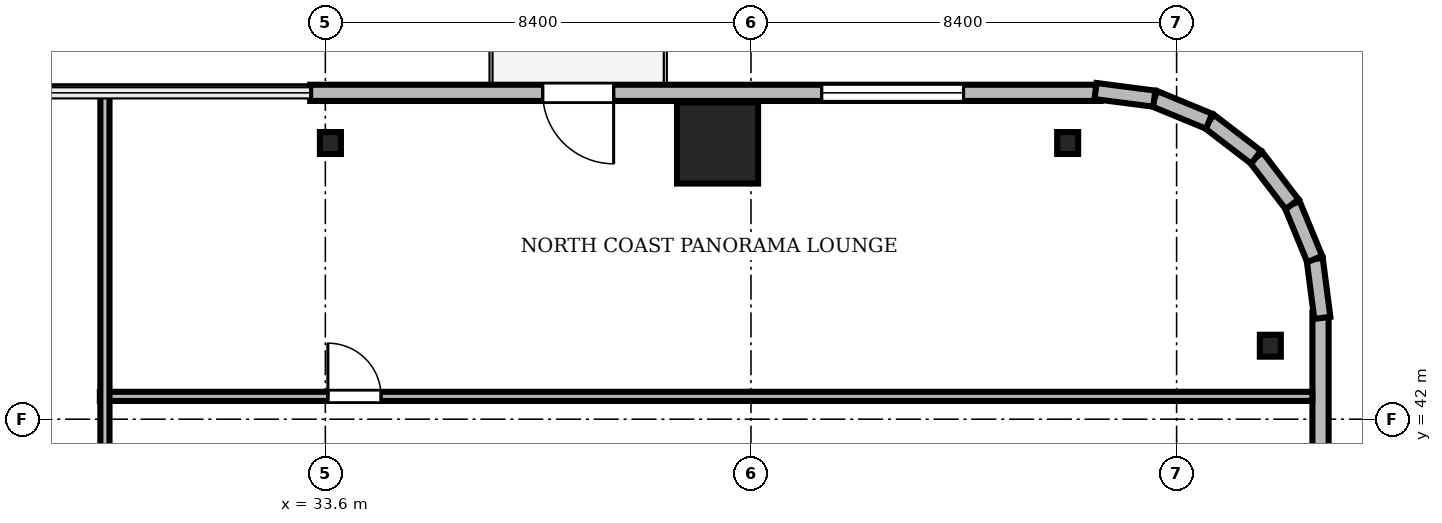
"""IFC4 building model, lengths in metres.
Left out: names, types, materials, properties, quantities, classifications, styles, units other than length and angle.
Written with IfcOpenShell. Run it as: python <this file> out.ifc"""

import sys

from ifc_helpers import new_model, si_unit, direction, frame, frame_2d, origin, origin_2d, place, context, subcontext, project, spatial, rectangle, i_section, extrude, source, transform, mapped, element, fill, save


model = new_model("IFC4")
c1 = context("Model", 3, precision=1e-05, world=origin(), true_north=direction((0.0, 1.0)))
c2 = subcontext(c1, "Body", "Model", "MODEL_VIEW")
j1 = project(units=[si_unit("LENGTHUNIT", "METRE"), si_unit("PLANEANGLEUNIT", "RADIAN")], contexts=[c1])
p1 = place(None, origin())
s1 = spatial("IfcSite", under=j1, at=p1, CompositionType="ELEMENT")
p2 = place(p1, origin())
s2 = spatial("IfcBuilding", under=s1, at=p2, CompositionType="ELEMENT")
p3 = place(p2, frame((0.0, 0.0, 103.7)))
s3 = spatial("IfcBuildingStorey", under=s2, at=p3, CompositionType="ELEMENT", Elevation=103.7)
m1 = source(origin(), c2, "Body", "SweptSolid", [
    extrude(rectangle(XDim=1.6, YDim=1.6, at=origin_2d()), origin(), (0.0, 0.0, 1.0), 3.56),
])
p4 = place(p3, frame((41.34, 47.45, 0.0), z_axis=(0.0, 0.0, 1.0), x_axis=(1.0, 0.0, 0.0)))
e1 = element("IfcColumn", 1, at=p4, inside=s3, PredefinedType="COLUMN", context=c2, shape_type="MappedRepresentation", body=[
    mapped(m1, transform((0.0, 0.0, 0.0), scale=1.0)),
])
m2 = source(origin(), c2, "Body", "SweptSolid", [
    extrude(i_section(OverallWidth=0.414, OverallDepth=0.432, WebThickness=0.026, FlangeThickness=0.04, FilletRadius=0.015, at=origin_2d()), origin(), (0.0, 0.0, 1.0), 3.56),
])
for number, where, z_axis, x_axis in (
    (2, (52.25, 43.45, 0.0), (0.0, 0.0, 1.0), (1.0, 0.0, 0.0)),
    (3, (48.25, 47.45, 0.0), (0.0, 0.0, 1.0), (1.0, 0.0, 0.0)),
    (4, (33.7, 47.45, 0.0), (0.0, 0.0, 1.0), (1.0, 0.0, 0.0)),
):
    element("IfcColumn", number, at=place(p3, frame(where, z_axis=z_axis, x_axis=x_axis)), inside=s3, PredefinedType="COLUMN", context=c2, shape_type="MappedRepresentation", body=[
        mapped(m2, transform((0.0, 0.0, 0.0), scale=1.0)),
    ])
m3 = source(origin(), c2, "Body", "SweptSolid", [
    extrude(rectangle(XDim=15.6, YDim=0.32, at=frame_2d((7.8, 0.0))), origin(), (0.0, 0.0, 1.0), 3.56),
])
p5 = place(p3, frame((48.9, 48.44, 0.0), z_axis=(0.0, 0.0, 1.0), x_axis=(-1.0, 0.0, 0.0)))
e5 = element("IfcWall", 5, at=p5, inside=s3, PredefinedType="SOLIDWALL", context=c2, shape_type="MappedRepresentation", body=[
    mapped(m3, transform((0.0, 0.0, 0.0), scale=1.0)),
])
m4 = source(origin(), c2, "Body", "SweptSolid", [
    extrude(rectangle(XDim=1.4, YDim=2.3, at=frame_2d((0.7, 1.15))), frame((0.0, 0.17, 0.0), z_axis=(0.0, -1.0, 0.0), x_axis=(1.0, 0.0, 0.0)), (0.0, 0.0, 1.0), 0.34),
])
p6 = place(p5, frame((9.61, 0.0, 0.0)))
e6 = element("IfcOpeningElement", 6, at=p6, cuts=e5, PredefinedType="OPENING", context=c2, shape_type="MappedRepresentation", body=[
    mapped(m4, transform((0.0, 0.0, 0.0), scale=1.0)),
])
m5 = source(origin(), c2, "Body", "SweptSolid", [
    extrude(rectangle(XDim=2.8, YDim=2.4, at=frame_2d((1.4, 1.2))), frame((0.0, 0.17, 0.0), z_axis=(0.0, -1.0, 0.0), x_axis=(1.0, 0.0, 0.0)), (0.0, 0.0, 1.0), 0.34),
])
p7 = place(p5, frame((2.705, 0.0, 0.72)))
e7 = element("IfcOpeningElement", 7, at=p7, cuts=e5, PredefinedType="OPENING", context=c2, shape_type="MappedRepresentation", body=[
    mapped(m5, transform((0.0, 0.0, 0.0), scale=1.0)),
])
m6 = source(origin(), c2, "Body", "SweptSolid", [
    extrude(rectangle(XDim=15.6, YDim=0.32, at=frame_2d((7.8, 0.0))), origin(), (0.0, 0.0, 1.0), 3.56),
])
p8 = place(p3, frame((53.24, 28.5, 0.0), z_axis=(0.0, 0.0, 1.0), x_axis=(0.0, 1.0, 0.0)))
e8 = element("IfcWall", 8, at=p8, inside=s3, PredefinedType="SOLIDWALL", context=c2, shape_type="MappedRepresentation", body=[
    mapped(m6, transform((0.0, 0.0, 0.0), scale=1.0)),
])
p9 = place(p8, frame((10.095, 0.0, 0.72)))
e9 = element("IfcOpeningElement", 9, at=p9, cuts=e8, PredefinedType="OPENING", context=c2, shape_type="MappedRepresentation", body=[
    mapped(m5, transform((0.0, 0.0, 0.0), scale=1.0)),
])
m7 = source(origin(), c2, "Body", "SweptSolid", [
    extrude(rectangle(XDim=1.17, YDim=0.32, at=frame_2d((0.585, 0.0))), origin(), (0.0, 0.0, 1.0), 3.56),
])
p10 = place(p3, frame((53.276, 44.0, 0.0), z_axis=(0.0, 0.0, 1.0), x_axis=(-0.128295670475, 0.991735963317, 0.0)))
e10 = element("IfcWall", 10, at=p10, inside=s3, PredefinedType="SOLIDWALL", context=c2, shape_type="MappedRepresentation", body=[
    mapped(m7, transform((0.0, 0.0, 0.0), scale=1.0)),
])
m8 = source(origin(), c2, "Body", "SweptSolid", [
    extrude(rectangle(XDim=1.169, YDim=0.32, at=frame_2d((0.584, 0.0))), origin(), (0.0, 0.0, 1.0), 3.56),
])
p11 = place(p3, frame((53.125, 45.16, 0.0), z_axis=(0.0, 0.0, 1.0), x_axis=(-0.381054331552, 0.924552646638, 0.0)))
e11 = element("IfcWall", 11, at=p11, inside=s3, PredefinedType="SOLIDWALL", context=c2, shape_type="MappedRepresentation", body=[
    mapped(m8, transform((0.0, 0.0, 0.0), scale=1.0)),
])
m9 = source(origin(), c2, "Body", "SweptSolid", [
    extrude(rectangle(XDim=1.169, YDim=0.32, at=frame_2d((0.584, 0.0))), origin(), (0.0, 0.0, 1.0), 3.56),
])
p12 = place(p3, frame((52.68, 46.241, 0.0), z_axis=(0.0, 0.0, 1.0), x_axis=(-0.608387696831, 0.793639975269, 0.0)))
e12 = element("IfcWall", 12, at=p12, inside=s3, PredefinedType="SOLIDWALL", context=c2, shape_type="MappedRepresentation", body=[
    mapped(m9, transform((0.0, 0.0, 0.0), scale=1.0)),
])
m10 = source(origin(), c2, "Body", "SweptSolid", [
    extrude(rectangle(XDim=1.169, YDim=0.32, at=frame_2d((0.584, 0.0))), origin(), (0.0, 0.0, 1.0), 3.56),
])
p13 = place(p3, frame((51.969, 47.169, 0.0), z_axis=(0.0, 0.0, 1.0), x_axis=(-0.793663520347, 0.608356981114, 0.0)))
e13 = element("IfcWall", 13, at=p13, inside=s3, PredefinedType="SOLIDWALL", context=c2, shape_type="MappedRepresentation", body=[
    mapped(m10, transform((0.0, 0.0, 0.0), scale=1.0)),
])
p14 = place(p3, frame((51.041, 47.88, 0.0), z_axis=(0.0, 0.0, 1.0), x_axis=(-0.924552646638, 0.381054331552, 0.0)))
e14 = element("IfcWall", 14, at=p14, inside=s3, PredefinedType="SOLIDWALL", context=c2, shape_type="MappedRepresentation", body=[
    mapped(m8, transform((0.0, 0.0, 0.0), scale=1.0)),
])
p15 = place(p3, frame((49.96, 48.325, 0.0), z_axis=(0.0, 0.0, 1.0), x_axis=(-0.991735963317, 0.128295670475, 0.0)))
e15 = element("IfcWall", 15, at=p15, inside=s3, PredefinedType="SOLIDWALL", context=c2, shape_type="MappedRepresentation", body=[
    mapped(m7, transform((0.0, 0.0, 0.0), scale=1.0)),
])
m11 = source(origin(), c2, "Body", "SweptSolid", [
    extrude(rectangle(XDim=23.928, YDim=0.18, at=frame_2d((11.964, 0.0))), origin(), (0.0, 0.0, 1.0), 2.802),
])
p16 = place(p3, frame((29.15, 42.45, 0.0), z_axis=(0.0, 0.0, 1.0), x_axis=(1.0, 0.0, 0.0)))
e16 = element("IfcWall", 16, at=p16, inside=s3, PredefinedType="PARTITIONING", context=c2, shape_type="MappedRepresentation", body=[
    mapped(m11, transform((0.0, 0.0, 0.0), scale=1.0)),
])
m12 = source(origin(), c2, "Body", "SweptSolid", [
    extrude(rectangle(XDim=1.05, YDim=2.2, at=frame_2d((0.525, 1.1))), frame((0.0, 0.1, 0.0), z_axis=(0.0, -1.0, 0.0), x_axis=(1.0, 0.0, 0.0)), (0.0, 0.0, 1.0), 0.2),
])
p17 = place(p16, frame((4.5, 0.0, 0.0)))
e17 = element("IfcOpeningElement", 17, at=p17, cuts=e16, PredefinedType="OPENING", context=c2, shape_type="MappedRepresentation", body=[
    mapped(m12, transform((0.0, 0.0, 0.0), scale=1.0)),
])
m13 = source(origin(), c2, "Body", "SweptSolid", [
    extrude(rectangle(XDim=11.45, YDim=0.18, at=frame_2d((5.725, 0.0))), origin(), (0.0, 0.0, 1.0), 2.802),
])
p18 = place(p3, frame((29.25, 37.02, 0.0), z_axis=(0.0, 0.0, 1.0), x_axis=(0.0, 1.0, 0.0)))
e18 = element("IfcWall", 18, at=p18, inside=s3, PredefinedType="PARTITIONING", context=c2, shape_type="MappedRepresentation", body=[
    mapped(m13, transform((0.0, 0.0, 0.0), scale=1.0)),
])
m14 = source(origin(), c2, "Body", "SweptSolid", [
    extrude(rectangle(XDim=1.4, YDim=2.3, at=frame_2d((0.7, 1.15))), frame((0.0, 0.025, 0.0), z_axis=(0.0, -1.0, 0.0), x_axis=(1.0, 0.0, 0.0)), (0.0, 0.0, 1.0), 0.05),
])
p19 = place(p6, frame((1.4, 0.0, 0.0), z_axis=(0.0, 0.0, 1.0), x_axis=(-1.0, 0.0, 0.0)))
e19 = element("IfcDoor", 19, at=p19, inside=s3, OperationType="DOUBLE_DOOR_SLIDING", PredefinedType="DOOR", context=c2, shape_type="MappedRepresentation", body=[
    mapped(m14, transform((0.0, 0.0, 0.0), scale=1.0)),
])
fill(e6, e19)
m15 = source(origin(), c2, "Body", "SweptSolid", [
    extrude(rectangle(XDim=2.8, YDim=2.4, at=frame_2d((1.4, 1.2))), frame((0.0, 0.03, 0.0), z_axis=(0.0, -1.0, 0.0), x_axis=(1.0, 0.0, 0.0)), (0.0, 0.0, 1.0), 0.06),
])
p20 = place(p7, origin())
e20 = element("IfcWindow", 20, at=p20, inside=s3, PartitioningType="SINGLE_PANEL", PredefinedType="WINDOW", context=c2, shape_type="MappedRepresentation", body=[
    mapped(m15, transform((0.0, 0.0, 0.0), scale=1.0)),
])
fill(e7, e20)
m16 = source(origin(), c2, "Body", "SweptSolid", [
    extrude(rectangle(XDim=1.05, YDim=2.2, at=frame_2d((0.525, 1.1))), frame((0.0, 0.025, 0.0), z_axis=(0.0, -1.0, 0.0), x_axis=(1.0, 0.0, 0.0)), (0.0, 0.0, 1.0), 0.05),
])
p21 = place(p17, origin())
e21 = element("IfcDoor", 21, at=p21, inside=s3, OperationType="SINGLE_SWING_LEFT", PredefinedType="DOOR", context=c2, shape_type="MappedRepresentation", body=[
    mapped(m16, transform((0.0, 0.0, 0.0), scale=1.0)),
])
fill(e17, e21)
save(model, sys.argv[1])
